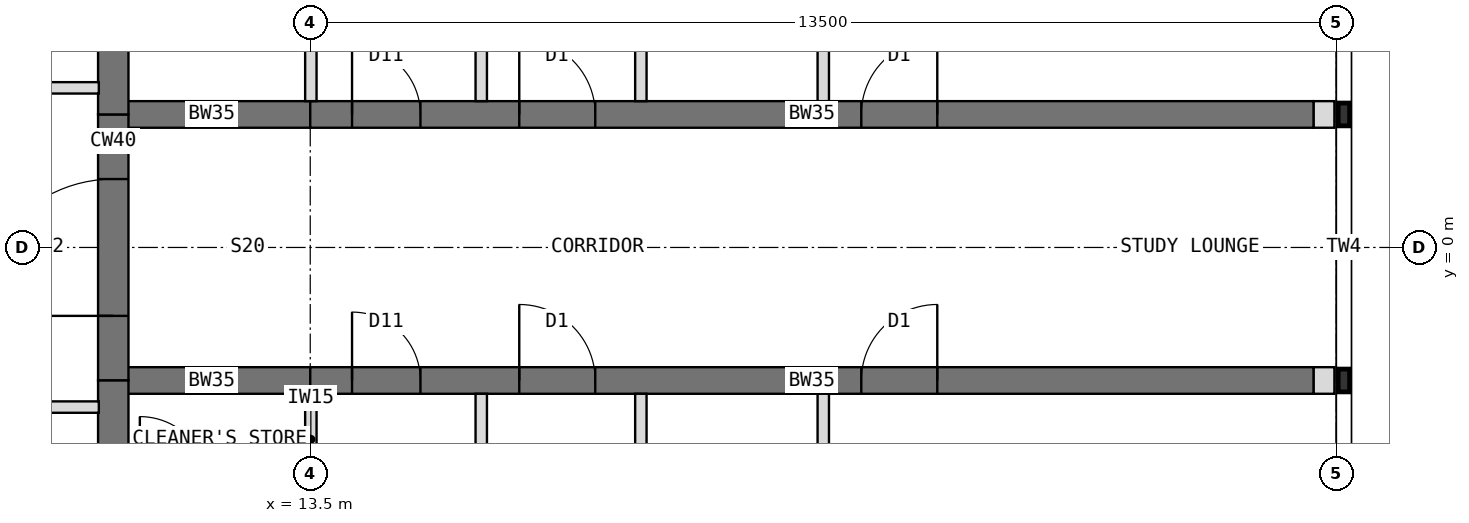
"""IFC4 building model, lengths in metres.
Left out: names, types, materials, properties, quantities, classifications, styles, units other than length and angle.
Written with IfcOpenShell. Run it as: python <this file> out.ifc"""

import sys

from ifc_helpers import new_model, si_unit, direction, frame, frame_2d, origin, place, context, subcontext, project, spatial, rectangle, extrude, element, fill, save


model = new_model("IFC4")
c1 = context("Model", 3, precision=1e-05, world=origin(), true_north=direction((0.0, 1.0)))
c2 = subcontext(c1, "Body", "Model", "MODEL_VIEW")
j1 = project(units=[si_unit("LENGTHUNIT", "METRE"), si_unit("PLANEANGLEUNIT", "RADIAN")], contexts=[c1])
p1 = place(None, origin())
s1 = spatial("IfcSite", under=j1, at=p1, CompositionType="ELEMENT")
p2 = place(p1, origin())
s2 = spatial("IfcBuilding", under=s1, at=p2, CompositionType="ELEMENT")
p3 = place(p2, frame((0.0, 0.0, 259.5)))
s3 = spatial("IfcBuildingStorey", under=s2, at=p3, CompositionType="ELEMENT", Elevation=259.5)
p4 = place(p3, frame((10.908, -6.298, 0.0), z_axis=(0.0, 0.0, 1.0), x_axis=(0.0, 1.0, 0.0)))
e1 = element("IfcWall", 1, at=p4, inside=s3, PredefinedType="SHEAR", context=c2, shape_type="SweptSolid", body=[
    extrude(rectangle(XDim=4.548, YDim=0.4, at=frame_2d((2.274, 0.0))), origin(), (0.0, 0.0, 1.0), 4.0),
])
p5 = place(p3, frame((10.908, -1.75, 0.0), z_axis=(0.0, 0.0, 1.0), x_axis=(0.0, 1.0, 0.0)))
e2 = element("IfcWall", 2, at=p5, inside=s3, PredefinedType="SHEAR", context=c2, shape_type="SweptSolid", body=[
    extrude(rectangle(XDim=3.5, YDim=0.4, at=frame_2d((1.75, 0.0))), origin(), (0.0, 0.0, 1.0), 4.0),
])
p6 = place(p5, frame((0.85, 0.0, 0.0)))
e3 = element("IfcOpeningElement", 3, at=p6, cuts=e2, PredefinedType="OPENING", context=c2, shape_type="SweptSolid", body=[
    extrude(rectangle(XDim=1.8, YDim=2.1, at=frame_2d((0.9, 1.05))), frame((0.0, 0.21, 0.0), z_axis=(0.0, -1.0, 0.0), x_axis=(1.0, 0.0, 0.0)), (0.0, 0.0, 1.0), 0.42),
])
p7 = place(p3, frame((10.908, 1.75, 0.0), z_axis=(0.0, 0.0, 1.0), x_axis=(0.0, 1.0, 0.0)))
e4 = element("IfcWall", 4, at=p7, inside=s3, PredefinedType="SHEAR", context=c2, shape_type="SweptSolid", body=[
    extrude(rectangle(XDim=4.548, YDim=0.4, at=frame_2d((2.274, 0.0))), origin(), (0.0, 0.0, 1.0), 4.0),
])
p8 = place(p3, frame((10.908, 1.75, 0.0), z_axis=(0.0, 0.0, 1.0), x_axis=(1.0, 0.0, 0.0)))
e5 = element("IfcWall", 5, at=p8, inside=s3, PredefinedType="SHEAR", context=c2, shape_type="SweptSolid", body=[
    extrude(rectangle(XDim=2.592, YDim=0.35, at=frame_2d((1.296, 0.0))), origin(), (0.0, 0.0, 1.0), 4.0),
])
p9 = place(p3, frame((13.5, 1.75, 0.0), z_axis=(0.0, 0.0, 1.0), x_axis=(1.0, 0.0, 0.0)))
e6 = element("IfcWall", 6, at=p9, inside=s3, PredefinedType="SHEAR", context=c2, shape_type="SweptSolid", body=[
    extrude(rectangle(XDim=13.2, YDim=0.35, at=frame_2d((6.6, 0.0))), origin(), (0.0, 0.0, 1.0), 4.0),
])
p10 = place(p9, frame((0.55, 0.0, 0.0)))
e7 = element("IfcOpeningElement", 7, at=p10, cuts=e6, PredefinedType="OPENING", context=c2, shape_type="SweptSolid", body=[
    extrude(rectangle(XDim=0.9, YDim=2.1, at=frame_2d((0.45, 1.05))), frame((0.0, 0.185, 0.0), z_axis=(0.0, -1.0, 0.0), x_axis=(1.0, 0.0, 0.0)), (0.0, 0.0, 1.0), 0.37),
])
p11 = place(p9, frame((2.75, 0.0, 0.0)))
e8 = element("IfcOpeningElement", 8, at=p11, cuts=e6, PredefinedType="OPENING", context=c2, shape_type="SweptSolid", body=[
    extrude(rectangle(XDim=1.0, YDim=2.1, at=frame_2d((0.5, 1.05))), frame((0.0, 0.185, 0.0), z_axis=(0.0, -1.0, 0.0), x_axis=(1.0, 0.0, 0.0)), (0.0, 0.0, 1.0), 0.37),
])
p12 = place(p9, frame((7.25, 0.0, 0.0)))
e9 = element("IfcOpeningElement", 9, at=p12, cuts=e6, PredefinedType="OPENING", context=c2, shape_type="SweptSolid", body=[
    extrude(rectangle(XDim=1.0, YDim=2.1, at=frame_2d((0.5, 1.05))), frame((0.0, 0.185, 0.0), z_axis=(0.0, -1.0, 0.0), x_axis=(1.0, 0.0, 0.0)), (0.0, 0.0, 1.0), 0.37),
])
p13 = place(p3, frame((10.908, -1.75, 0.0), z_axis=(0.0, 0.0, 1.0), x_axis=(1.0, 0.0, 0.0)))
e10 = element("IfcWall", 10, at=p13, inside=s3, PredefinedType="SHEAR", context=c2, shape_type="SweptSolid", body=[
    extrude(rectangle(XDim=2.592, YDim=0.35, at=frame_2d((1.296, 0.0))), origin(), (0.0, 0.0, 1.0), 4.0),
])
p14 = place(p3, frame((13.5, -1.75, 0.0), z_axis=(0.0, 0.0, 1.0), x_axis=(1.0, 0.0, 0.0)))
e11 = element("IfcWall", 11, at=p14, inside=s3, PredefinedType="SHEAR", context=c2, shape_type="SweptSolid", body=[
    extrude(rectangle(XDim=13.2, YDim=0.35, at=frame_2d((6.6, 0.0))), origin(), (0.0, 0.0, 1.0), 4.0),
])
p15 = place(p14, frame((0.55, 0.0, 0.0)))
e12 = element("IfcOpeningElement", 12, at=p15, cuts=e11, PredefinedType="OPENING", context=c2, shape_type="SweptSolid", body=[
    extrude(rectangle(XDim=0.9, YDim=2.1, at=frame_2d((0.45, 1.05))), frame((0.0, 0.185, 0.0), z_axis=(0.0, -1.0, 0.0), x_axis=(1.0, 0.0, 0.0)), (0.0, 0.0, 1.0), 0.37),
])
p16 = place(p14, frame((2.75, 0.0, 0.0)))
e13 = element("IfcOpeningElement", 13, at=p16, cuts=e11, PredefinedType="OPENING", context=c2, shape_type="SweptSolid", body=[
    extrude(rectangle(XDim=1.0, YDim=2.1, at=frame_2d((0.5, 1.05))), frame((0.0, 0.185, 0.0), z_axis=(0.0, -1.0, 0.0), x_axis=(1.0, 0.0, 0.0)), (0.0, 0.0, 1.0), 0.37),
])
p17 = place(p14, frame((7.25, 0.0, 0.0)))
e14 = element("IfcOpeningElement", 14, at=p17, cuts=e11, PredefinedType="OPENING", context=c2, shape_type="SweptSolid", body=[
    extrude(rectangle(XDim=1.0, YDim=2.1, at=frame_2d((0.5, 1.05))), frame((0.0, 0.185, 0.0), z_axis=(0.0, -1.0, 0.0), x_axis=(1.0, 0.0, 0.0)), (0.0, 0.0, 1.0), 0.37),
])
for number, where, z_axis, x_axis in (
    (15, (26.7, 1.75, 0.0), (0.0, 0.0, 1.0), (1.0, 0.0, 0.0)),
    (16, (26.7, -1.75, 0.0), (0.0, 0.0, 1.0), (1.0, 0.0, 0.0)),
):
    element("IfcWall", number, at=place(p3, frame(where, z_axis=z_axis, x_axis=x_axis)), inside=s3, PredefinedType="PARTITIONING", context=c2, shape_type="SweptSolid", body=[
        extrude(rectangle(XDim=0.275, YDim=0.35, at=frame_2d((0.138, 0.0))), origin(), (0.0, 0.0, 1.0), 3.8),
    ])
for number, where, z_axis, x_axis in (
    (17, (15.75, 1.925, 0.0), (0.0, 0.0, 1.0), (0.0, 1.0, 0.0)),
    (18, (20.25, 1.925, 0.0), (0.0, 0.0, 1.0), (0.0, 1.0, 0.0)),
):
    element("IfcWall", number, at=place(p3, frame(where, z_axis=z_axis, x_axis=x_axis)), inside=s3, PredefinedType="PARTITIONING", context=c2, shape_type="SweptSolid", body=[
        extrude(rectangle(XDim=4.825, YDim=0.15, at=frame_2d((2.413, 0.0))), origin(), (0.0, 0.0, 1.0), 3.8),
    ])
p18 = place(p3, frame((17.85, 1.925, 0.0), z_axis=(0.0, 0.0, 1.0), x_axis=(0.0, 1.0, 0.0)))
e19 = element("IfcWall", 19, at=p18, inside=s3, PredefinedType="PARTITIONING", context=c2, shape_type="SweptSolid", body=[
    extrude(rectangle(XDim=3.4, YDim=0.15, at=frame_2d((1.7, 0.0))), origin(), (0.0, 0.0, 1.0), 3.8),
])
p19 = place(p18, frame((1.2, 0.0, 0.0)))
e20 = element("IfcOpeningElement", 20, at=p19, cuts=e19, PredefinedType="OPENING", context=c2, shape_type="SweptSolid", body=[
    extrude(rectangle(XDim=1.0, YDim=2.1, at=frame_2d((0.5, 1.05))), frame((0.0, 0.085, 0.0), z_axis=(0.0, -1.0, 0.0), x_axis=(1.0, 0.0, 0.0)), (0.0, 0.0, 1.0), 0.17),
])
p20 = place(p3, frame((13.508, 1.925, 0.0), z_axis=(0.0, 0.0, 1.0), x_axis=(0.0, 1.0, 0.0)))
e21 = element("IfcWall", 21, at=p20, inside=s3, PredefinedType="PARTITIONING", context=c2, shape_type="SweptSolid", body=[
    extrude(rectangle(XDim=3.2, YDim=0.15, at=frame_2d((1.6, 0.0))), origin(), (0.0, 0.0, 1.0), 3.267),
])
for number, where, z_axis, x_axis in (
    (22, (15.75, -1.925, 0.0), (0.0, 0.0, 1.0), (0.0, -1.0, 0.0)),
    (23, (20.25, -1.925, 0.0), (0.0, 0.0, 1.0), (0.0, -1.0, 0.0)),
):
    element("IfcWall", number, at=place(p3, frame(where, z_axis=z_axis, x_axis=x_axis)), inside=s3, PredefinedType="PARTITIONING", context=c2, shape_type="SweptSolid", body=[
        extrude(rectangle(XDim=4.825, YDim=0.15, at=frame_2d((2.413, 0.0))), origin(), (0.0, 0.0, 1.0), 3.8),
    ])
p21 = place(p3, frame((17.85, -1.925, 0.0), z_axis=(0.0, 0.0, 1.0), x_axis=(0.0, -1.0, 0.0)))
e24 = element("IfcWall", 24, at=p21, inside=s3, PredefinedType="PARTITIONING", context=c2, shape_type="SweptSolid", body=[
    extrude(rectangle(XDim=3.4, YDim=0.15, at=frame_2d((1.7, 0.0))), origin(), (0.0, 0.0, 1.0), 3.8),
])
p22 = place(p21, frame((1.2, 0.0, 0.0)))
e25 = element("IfcOpeningElement", 25, at=p22, cuts=e24, PredefinedType="OPENING", context=c2, shape_type="SweptSolid", body=[
    extrude(rectangle(XDim=1.0, YDim=2.1, at=frame_2d((0.5, 1.05))), frame((0.0, 0.085, 0.0), z_axis=(0.0, -1.0, 0.0), x_axis=(1.0, 0.0, 0.0)), (0.0, 0.0, 1.0), 0.17),
])
p23 = place(p3, frame((13.508, -1.925, 0.0), z_axis=(0.0, 0.0, 1.0), x_axis=(0.0, -1.0, 0.0)))
e26 = element("IfcWall", 26, at=p23, inside=s3, PredefinedType="PARTITIONING", context=c2, shape_type="SweptSolid", body=[
    extrude(rectangle(XDim=1.2, YDim=0.15, at=frame_2d((0.6, 0.0))), origin(), (0.0, 0.0, 1.0), 3.267),
])
p24 = place(p3, frame((6.143, 2.1, 0.0), z_axis=(0.0, 0.0, 1.0), x_axis=(1.0, 0.0, 0.0)))
e27 = element("IfcWall", 27, at=p24, inside=s3, PredefinedType="PARTITIONING", context=c2, shape_type="SweptSolid", body=[
    extrude(rectangle(XDim=4.576, YDim=0.15, at=frame_2d((2.288, 0.0))), origin(), (0.0, 0.0, 1.0), 3.8),
])
p25 = place(p24, frame((2.703, 0.0, 0.0)))
e28 = element("IfcOpeningElement", 28, at=p25, cuts=e27, PredefinedType="OPENING", context=c2, shape_type="SweptSolid", body=[
    extrude(rectangle(XDim=1.0, YDim=2.1, at=frame_2d((0.5, 1.05))), frame((0.0, 0.085, 0.0), z_axis=(0.0, -1.0, 0.0), x_axis=(1.0, 0.0, 0.0)), (0.0, 0.0, 1.0), 0.17),
])
p26 = place(p3, frame((10.718, -2.1, 0.0), z_axis=(0.0, 0.0, 1.0), x_axis=(-1.0, 0.0, 0.0)))
e29 = element("IfcWall", 29, at=p26, inside=s3, PredefinedType="PARTITIONING", context=c2, shape_type="SweptSolid", body=[
    extrude(rectangle(XDim=4.576, YDim=0.15, at=frame_2d((2.288, 0.0))), origin(), (0.0, 0.0, 1.0), 3.8),
])
p27 = place(p26, frame((2.703, 0.0, 0.0)))
e30 = element("IfcOpeningElement", 30, at=p27, cuts=e29, PredefinedType="OPENING", context=c2, shape_type="SweptSolid", body=[
    extrude(rectangle(XDim=1.0, YDim=2.1, at=frame_2d((0.5, 1.05))), frame((0.0, 0.085, 0.0), z_axis=(0.0, -1.0, 0.0), x_axis=(1.0, 0.0, 0.0)), (0.0, 0.0, 1.0), 0.17),
])
p28 = place(p6, origin())
e31 = element("IfcDoor", 31, at=p28, inside=s3, OperationType="DOUBLE_DOOR_DOUBLE_SWING", PredefinedType="DOOR", context=c2, shape_type="SweptSolid", body=[
    extrude(rectangle(XDim=1.8, YDim=2.1, at=frame_2d((0.9, 1.05))), frame((0.0, 0.025, 0.0), z_axis=(0.0, -1.0, 0.0), x_axis=(1.0, 0.0, 0.0)), (0.0, 0.0, 1.0), 0.05),
])
fill(e3, e31)
p29 = place(p10, origin())
e32 = element("IfcDoor", 32, at=p29, inside=s3, OperationType="SINGLE_SWING_LEFT", PredefinedType="DOOR", context=c2, shape_type="SweptSolid", body=[
    extrude(rectangle(XDim=0.9, YDim=2.1, at=frame_2d((0.45, 1.05))), frame((0.0, 0.025, 0.0), z_axis=(0.0, -1.0, 0.0), x_axis=(1.0, 0.0, 0.0)), (0.0, 0.0, 1.0), 0.05),
])
fill(e7, e32)
p30 = place(p11, origin())
e33 = element("IfcDoor", 33, at=p30, inside=s3, OperationType="SINGLE_SWING_LEFT", PredefinedType="DOOR", context=c2, shape_type="SweptSolid", body=[
    extrude(rectangle(XDim=1.0, YDim=2.1, at=frame_2d((0.5, 1.05))), frame((0.0, 0.025, 0.0), z_axis=(0.0, -1.0, 0.0), x_axis=(1.0, 0.0, 0.0)), (0.0, 0.0, 1.0), 0.05),
])
fill(e8, e33)
p31 = place(p12, origin())
e34 = element("IfcDoor", 34, at=p31, inside=s3, OperationType="SINGLE_SWING_RIGHT", PredefinedType="DOOR", context=c2, shape_type="SweptSolid", body=[
    extrude(rectangle(XDim=1.0, YDim=2.1, at=frame_2d((0.5, 1.05))), frame((0.0, 0.025, 0.0), z_axis=(0.0, -1.0, 0.0), x_axis=(1.0, 0.0, 0.0)), (0.0, 0.0, 1.0), 0.05),
])
fill(e9, e34)
p32 = place(p15, origin())
e35 = element("IfcDoor", 35, at=p32, inside=s3, OperationType="SINGLE_SWING_LEFT", PredefinedType="DOOR", context=c2, shape_type="SweptSolid", body=[
    extrude(rectangle(XDim=0.9, YDim=2.1, at=frame_2d((0.45, 1.05))), frame((0.0, 0.025, 0.0), z_axis=(0.0, -1.0, 0.0), x_axis=(1.0, 0.0, 0.0)), (0.0, 0.0, 1.0), 0.05),
])
fill(e12, e35)
p33 = place(p16, origin())
e36 = element("IfcDoor", 36, at=p33, inside=s3, OperationType="SINGLE_SWING_LEFT", PredefinedType="DOOR", context=c2, shape_type="SweptSolid", body=[
    extrude(rectangle(XDim=1.0, YDim=2.1, at=frame_2d((0.5, 1.05))), frame((0.0, 0.025, 0.0), z_axis=(0.0, -1.0, 0.0), x_axis=(1.0, 0.0, 0.0)), (0.0, 0.0, 1.0), 0.05),
])
fill(e13, e36)
p34 = place(p17, origin())
e37 = element("IfcDoor", 37, at=p34, inside=s3, OperationType="SINGLE_SWING_RIGHT", PredefinedType="DOOR", context=c2, shape_type="SweptSolid", body=[
    extrude(rectangle(XDim=1.0, YDim=2.1, at=frame_2d((0.5, 1.05))), frame((0.0, 0.025, 0.0), z_axis=(0.0, -1.0, 0.0), x_axis=(1.0, 0.0, 0.0)), (0.0, 0.0, 1.0), 0.05),
])
fill(e14, e37)
save(model, sys.argv[1])
